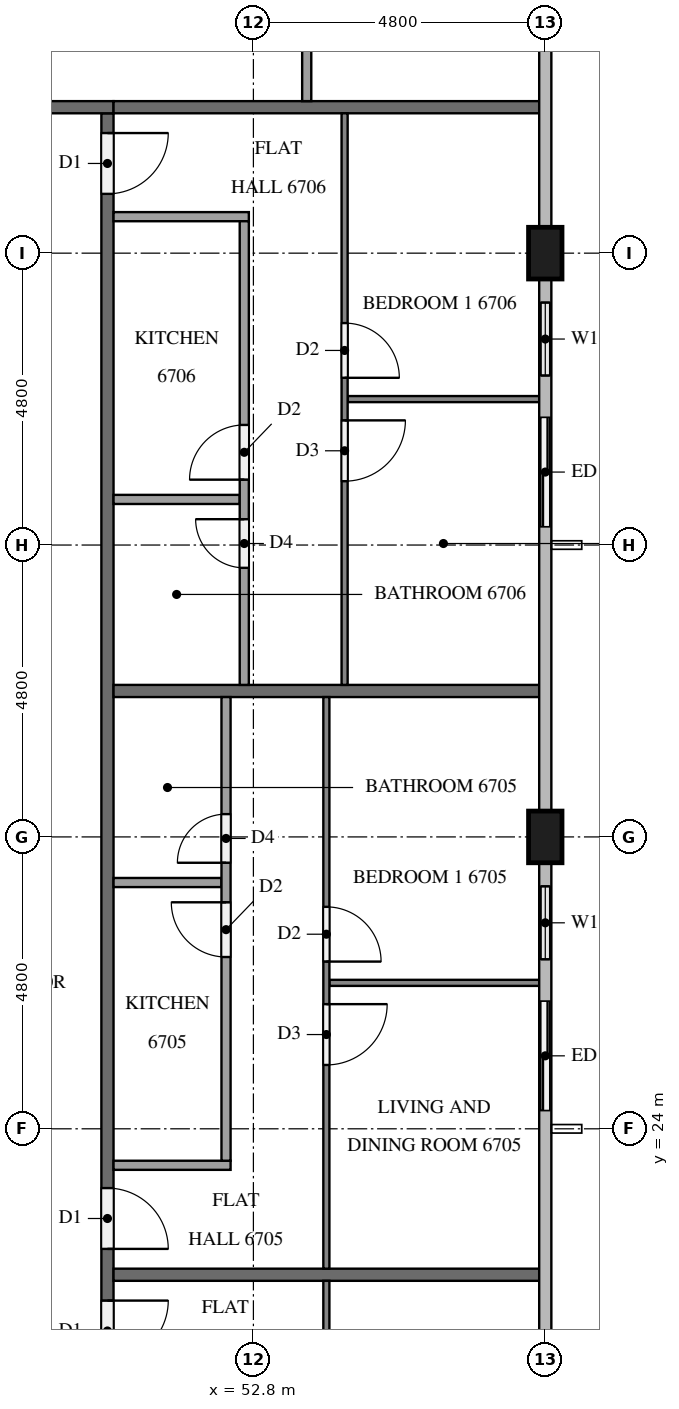
"""IFC4 building model, lengths in metres.
Left out: names, types, materials, properties, quantities, classifications, styles, units other than length and angle.
Written with IfcOpenShell. Run it as: python <this file> out.ifc"""

import sys

from ifc_helpers import new_model, si_unit, direction, frame, frame_2d, origin, origin_2d, place, context, subcontext, project, spatial, rectangle, extrude, element, fill, save


model = new_model("IFC4")
c1 = context("Model", 3, precision=1e-05, world=origin(), true_north=direction((0.0, 1.0)))
c2 = subcontext(c1, "Body", "Model", "MODEL_VIEW")
j1 = project(units=[si_unit("LENGTHUNIT", "METRE"), si_unit("PLANEANGLEUNIT", "RADIAN")], contexts=[c1])
p1 = place(None, origin())
s1 = spatial("IfcSite", under=j1, at=p1, CompositionType="ELEMENT")
p2 = place(p1, origin())
s2 = spatial("IfcBuilding", under=s1, at=p2, CompositionType="ELEMENT")
p3 = place(p2, frame((0.0, 0.0, 256.2)))
s3 = spatial("IfcBuildingStorey", under=s2, at=p3, CompositionType="ELEMENT", Elevation=256.2)
for number, where, z_axis, x_axis in (
    (1, (57.6, 28.8, 0.0), (0.0, 0.0, 1.0), (0.0, 1.0, 0.0)),
    (2, (57.6, 38.4, 0.0), (0.0, 0.0, 1.0), (0.0, 1.0, 0.0)),
):
    element("IfcColumn", number, at=place(p3, frame(where, z_axis=z_axis, x_axis=x_axis)), inside=s3, PredefinedType="COLUMN", context=c2, shape_type="SweptSolid", body=[
        extrude(rectangle(XDim=0.85, YDim=0.55, at=origin_2d()), origin(), (0.0, 0.0, 1.0), 3.2),
    ])
p4 = place(p3, frame((57.6, 24.0, 0.0), z_axis=(0.0, 0.0, 1.0), x_axis=(0.0, 1.0, 0.0)))
e3 = element("IfcWall", 3, at=p4, inside=s3, PredefinedType="SOLIDWALL", context=c2, shape_type="SweptSolid", body=[
    extrude(rectangle(XDim=4.375, YDim=0.15, at=frame_2d((2.188, 0.0))), origin(), (0.0, 0.0, 1.0), 3.2),
])
p5 = place(p4, frame((0.3, 0.0, 0.0)))
e4 = element("IfcOpeningElement", 4, at=p5, cuts=e3, PredefinedType="OPENING", context=c2, shape_type="SweptSolid", body=[
    extrude(rectangle(XDim=1.8, YDim=2.4, at=frame_2d((0.9, 1.2))), frame((0.0, 0.085, 0.0), z_axis=(0.0, -1.0, 0.0), x_axis=(1.0, 0.0, 0.0)), (0.0, 0.0, 1.0), 0.17),
])
p6 = place(p4, frame((2.788, 0.0, 0.9)))
e5 = element("IfcOpeningElement", 5, at=p6, cuts=e3, PredefinedType="OPENING", context=c2, shape_type="SweptSolid", body=[
    extrude(rectangle(XDim=1.2, YDim=1.4, at=frame_2d((0.6, 0.7))), frame((0.0, 0.085, 0.0), z_axis=(0.0, -1.0, 0.0), x_axis=(1.0, 0.0, 0.0)), (0.0, 0.0, 1.0), 0.17),
])
p7 = place(p3, frame((57.6, 33.6, 0.0), z_axis=(0.0, 0.0, 1.0), x_axis=(0.0, 1.0, 0.0)))
e6 = element("IfcWall", 6, at=p7, inside=s3, PredefinedType="SOLIDWALL", context=c2, shape_type="SweptSolid", body=[
    extrude(rectangle(XDim=4.375, YDim=0.15, at=frame_2d((2.188, 0.0))), origin(), (0.0, 0.0, 1.0), 3.2),
])
p8 = place(p7, frame((0.3, 0.0, 0.0)))
e7 = element("IfcOpeningElement", 7, at=p8, cuts=e6, PredefinedType="OPENING", context=c2, shape_type="SweptSolid", body=[
    extrude(rectangle(XDim=1.8, YDim=2.4, at=frame_2d((0.9, 1.2))), frame((0.0, 0.085, 0.0), z_axis=(0.0, -1.0, 0.0), x_axis=(1.0, 0.0, 0.0)), (0.0, 0.0, 1.0), 0.17),
])
p9 = place(p7, frame((2.788, 0.0, 0.9)))
e8 = element("IfcOpeningElement", 8, at=p9, cuts=e6, PredefinedType="OPENING", context=c2, shape_type="SweptSolid", body=[
    extrude(rectangle(XDim=1.2, YDim=1.4, at=frame_2d((0.6, 0.7))), frame((0.0, 0.085, 0.0), z_axis=(0.0, -1.0, 0.0), x_axis=(1.0, 0.0, 0.0)), (0.0, 0.0, 1.0), 0.17),
])
p10 = place(p3, frame((50.4, 40.7, 0.0), z_axis=(0.0, 0.0, 1.0), x_axis=(0.0, -1.0, 0.0)))
e9 = element("IfcWall", 9, at=p10, inside=s3, PredefinedType="PARTITIONING", context=c2, shape_type="SweptSolid", body=[
    extrude(rectangle(XDim=28.6, YDim=0.2, at=frame_2d((14.3, 0.0))), origin(), (0.0, 0.0, 1.0), 3.2),
])
p11 = place(p10, frame((19.525, 0.0, 0.0)))
e10 = element("IfcOpeningElement", 10, at=p11, cuts=e9, PredefinedType="OPENING", context=c2, shape_type="SweptSolid", body=[
    extrude(rectangle(XDim=1.0, YDim=2.1, at=frame_2d((0.5, 1.05))), frame((0.0, 0.11, 0.0), z_axis=(0.0, -1.0, 0.0), x_axis=(1.0, 0.0, 0.0)), (0.0, 0.0, 1.0), 0.22),
])
p12 = place(p10, frame((17.675, 0.0, 0.0)))
e11 = element("IfcOpeningElement", 11, at=p12, cuts=e9, PredefinedType="OPENING", context=c2, shape_type="SweptSolid", body=[
    extrude(rectangle(XDim=1.0, YDim=2.1, at=frame_2d((0.5, 1.05))), frame((0.0, 0.11, 0.0), z_axis=(0.0, -1.0, 0.0), x_axis=(1.0, 0.0, 0.0)), (0.0, 0.0, 1.0), 0.22),
])
p13 = place(p10, frame((0.325, 0.0, 0.0)))
e12 = element("IfcOpeningElement", 12, at=p13, cuts=e9, PredefinedType="OPENING", context=c2, shape_type="SweptSolid", body=[
    extrude(rectangle(XDim=1.0, YDim=2.1, at=frame_2d((0.5, 1.05))), frame((0.0, 0.11, 0.0), z_axis=(0.0, -1.0, 0.0), x_axis=(1.0, 0.0, 0.0)), (0.0, 0.0, 1.0), 0.22),
])
p14 = place(p3, frame((11.9, 40.8, 0.0), z_axis=(0.0, 0.0, 1.0), x_axis=(1.0, 0.0, 0.0)))
e13 = element("IfcWall", 13, at=p14, inside=s3, PredefinedType="PARTITIONING", context=c2, shape_type="SweptSolid", body=[
    extrude(rectangle(XDim=38.6, YDim=0.2, at=frame_2d((19.3, 0.0))), origin(), (0.0, 0.0, 1.0), 3.2),
])
p15 = place(p14, frame((31.725, 0.0, 0.0)))
e14 = element("IfcOpeningElement", 14, at=p15, cuts=e13, PredefinedType="OPENING", context=c2, shape_type="SweptSolid", body=[
    extrude(rectangle(XDim=1.0, YDim=2.1, at=frame_2d((0.5, 1.05))), frame((0.0, 0.11, 0.0), z_axis=(0.0, -1.0, 0.0), x_axis=(1.0, 0.0, 0.0)), (0.0, 0.0, 1.0), 0.22),
])
p16 = place(p14, frame((17.325, 0.0, 0.0)))
e15 = element("IfcOpeningElement", 15, at=p16, cuts=e13, PredefinedType="OPENING", context=c2, shape_type="SweptSolid", body=[
    extrude(rectangle(XDim=1.0, YDim=2.1, at=frame_2d((0.5, 1.05))), frame((0.0, 0.11, 0.0), z_axis=(0.0, -1.0, 0.0), x_axis=(1.0, 0.0, 0.0)), (0.0, 0.0, 1.0), 0.22),
])
p17 = place(p14, frame((0.525, 0.0, 0.0)))
e16 = element("IfcOpeningElement", 16, at=p17, cuts=e13, PredefinedType="OPENING", context=c2, shape_type="SweptSolid", body=[
    extrude(rectangle(XDim=1.0, YDim=2.1, at=frame_2d((0.5, 1.05))), frame((0.0, 0.11, 0.0), z_axis=(0.0, -1.0, 0.0), x_axis=(1.0, 0.0, 0.0)), (0.0, 0.0, 1.0), 0.22),
])
for number, where, z_axis, x_axis in (
    (17, (50.5, 21.6, 0.0), (0.0, 0.0, 1.0), (1.0, 0.0, 0.0)),
    (18, (50.5, 31.2, 0.0), (0.0, 0.0, 1.0), (1.0, 0.0, 0.0)),
    (19, (50.5, 40.8, 0.0), (0.0, 0.0, 1.0), (1.0, 0.0, 0.0)),
):
    element("IfcWall", number, at=place(p3, frame(where, z_axis=z_axis, x_axis=x_axis)), inside=s3, PredefinedType="PARTITIONING", context=c2, shape_type="SweptSolid", body=[
        extrude(rectangle(XDim=7.0, YDim=0.2, at=frame_2d((3.5, 0.0))), origin(), (0.0, 0.0, 1.0), 3.2),
    ])
p18 = place(p3, frame((54.0, 21.5, 0.0), z_axis=(0.0, 0.0, 1.0), x_axis=(0.0, -1.0, 0.0)))
e20 = element("IfcWall", 20, at=p18, inside=s3, PredefinedType="PARTITIONING", context=c2, shape_type="SweptSolid", body=[
    extrude(rectangle(XDim=16.279, YDim=0.1, at=frame_2d((8.139, 0.0))), origin(), (0.0, 0.0, 1.0), 3.2),
])
p19 = place(p18, frame((3.45, 0.0, 0.0)))
e21 = element("IfcOpeningElement", 21, at=p19, cuts=e20, PredefinedType="OPENING", context=c2, shape_type="SweptSolid", body=[
    extrude(rectangle(XDim=0.9, YDim=2.1, at=frame_2d((0.45, 1.05))), frame((0.0, 0.06, 0.0), z_axis=(0.0, -1.0, 0.0), x_axis=(1.0, 0.0, 0.0)), (0.0, 0.0, 1.0), 0.12),
])
p20 = place(p18, frame((5.05, 0.0, 0.0)))
e22 = element("IfcOpeningElement", 22, at=p20, cuts=e20, PredefinedType="OPENING", context=c2, shape_type="SweptSolid", body=[
    extrude(rectangle(XDim=0.9, YDim=2.1, at=frame_2d((0.45, 1.05))), frame((0.0, 0.06, 0.0), z_axis=(0.0, -1.0, 0.0), x_axis=(1.0, 0.0, 0.0)), (0.0, 0.0, 1.0), 0.12),
])
p21 = place(p18, frame((14.979, 0.0, 0.0)))
e23 = element("IfcOpeningElement", 23, at=p21, cuts=e20, PredefinedType="OPENING", context=c2, shape_type="SweptSolid", body=[
    extrude(rectangle(XDim=1.0, YDim=2.1, at=frame_2d((0.5, 1.05))), frame((0.0, 0.06, 0.0), z_axis=(0.0, -1.0, 0.0), x_axis=(1.0, 0.0, 0.0)), (0.0, 0.0, 1.0), 0.12),
])
p22 = place(p3, frame((54.05, 26.4, 0.0), z_axis=(0.0, 0.0, 1.0), x_axis=(1.0, 0.0, 0.0)))
e24 = element("IfcWall", 24, at=p22, inside=s3, PredefinedType="PARTITIONING", context=c2, shape_type="SweptSolid", body=[
    extrude(rectangle(XDim=3.45, YDim=0.1, at=frame_2d((1.725, 0.0))), origin(), (0.0, 0.0, 1.0), 3.2),
])
p23 = place(p3, frame((54.0, 31.1, 0.0), z_axis=(0.0, 0.0, 1.0), x_axis=(0.0, -1.0, 0.0)))
e25 = element("IfcWall", 25, at=p23, inside=s3, PredefinedType="PARTITIONING", context=c2, shape_type="SweptSolid", body=[
    extrude(rectangle(XDim=9.4, YDim=0.1, at=frame_2d((4.7, 0.0))), origin(), (0.0, 0.0, 1.0), 3.2),
])
p24 = place(p23, frame((5.05, 0.0, 0.0)))
e26 = element("IfcOpeningElement", 26, at=p24, cuts=e25, PredefinedType="OPENING", context=c2, shape_type="SweptSolid", body=[
    extrude(rectangle(XDim=1.0, YDim=2.1, at=frame_2d((0.5, 1.05))), frame((0.0, 0.06, 0.0), z_axis=(0.0, -1.0, 0.0), x_axis=(1.0, 0.0, 0.0)), (0.0, 0.0, 1.0), 0.12),
])
p25 = place(p23, frame((3.45, 0.0, 0.0)))
e27 = element("IfcOpeningElement", 27, at=p25, cuts=e25, PredefinedType="OPENING", context=c2, shape_type="SweptSolid", body=[
    extrude(rectangle(XDim=0.9, YDim=2.1, at=frame_2d((0.45, 1.05))), frame((0.0, 0.06, 0.0), z_axis=(0.0, -1.0, 0.0), x_axis=(1.0, 0.0, 0.0)), (0.0, 0.0, 1.0), 0.12),
])
p26 = place(p3, frame((50.5, 28.05, 0.0), z_axis=(0.0, 0.0, 1.0), x_axis=(1.0, 0.0, 0.0)))
e28 = element("IfcWall", 28, at=p26, inside=s3, PredefinedType="PARTITIONING", context=c2, shape_type="SweptSolid", body=[
    extrude(rectangle(XDim=1.775, YDim=0.15, at=frame_2d((0.887, 0.0))), origin(), (0.0, 0.0, 1.0), 3.2),
])
p27 = place(p3, frame((50.5, 23.4, 0.0), z_axis=(0.0, 0.0, 1.0), x_axis=(1.0, 0.0, 0.0)))
e29 = element("IfcWall", 29, at=p27, inside=s3, PredefinedType="PARTITIONING", context=c2, shape_type="SweptSolid", body=[
    extrude(rectangle(XDim=1.925, YDim=0.15, at=frame_2d((0.962, 0.0))), origin(), (0.0, 0.0, 1.0), 3.2),
])
p28 = place(p3, frame((52.35, 23.475, 0.0), z_axis=(0.0, 0.0, 1.0), x_axis=(0.0, 1.0, 0.0)))
e30 = element("IfcWall", 30, at=p28, inside=s3, PredefinedType="PARTITIONING", context=c2, shape_type="SweptSolid", body=[
    extrude(rectangle(XDim=7.625, YDim=0.15, at=frame_2d((3.812, 0.0))), origin(), (0.0, 0.0, 1.0), 3.2),
])
p29 = place(p28, frame((3.35, 0.0, 0.0)))
e31 = element("IfcOpeningElement", 31, at=p29, cuts=e30, PredefinedType="OPENING", context=c2, shape_type="SweptSolid", body=[
    extrude(rectangle(XDim=0.9, YDim=2.1, at=frame_2d((0.45, 1.05))), frame((0.0, 0.085, 0.0), z_axis=(0.0, -1.0, 0.0), x_axis=(1.0, 0.0, 0.0)), (0.0, 0.0, 1.0), 0.17),
])
p30 = place(p28, frame((4.9, 0.0, 0.0)))
e32 = element("IfcOpeningElement", 32, at=p30, cuts=e30, PredefinedType="OPENING", context=c2, shape_type="SweptSolid", body=[
    extrude(rectangle(XDim=0.8, YDim=2.1, at=frame_2d((0.4, 1.05))), frame((0.0, 0.085, 0.0), z_axis=(0.0, -1.0, 0.0), x_axis=(1.0, 0.0, 0.0)), (0.0, 0.0, 1.0), 0.17),
])
p31 = place(p3, frame((54.35, 36.0, 0.0), z_axis=(0.0, 0.0, 1.0), x_axis=(1.0, 0.0, 0.0)))
e33 = element("IfcWall", 33, at=p31, inside=s3, PredefinedType="PARTITIONING", context=c2, shape_type="SweptSolid", body=[
    extrude(rectangle(XDim=3.15, YDim=0.1, at=frame_2d((1.575, 0.0))), origin(), (0.0, 0.0, 1.0), 3.2),
])
p32 = place(p3, frame((54.3, 40.7, 0.0), z_axis=(0.0, 0.0, 1.0), x_axis=(0.0, -1.0, 0.0)))
e34 = element("IfcWall", 34, at=p32, inside=s3, PredefinedType="PARTITIONING", context=c2, shape_type="SweptSolid", body=[
    extrude(rectangle(XDim=9.4, YDim=0.1, at=frame_2d((4.7, 0.0))), origin(), (0.0, 0.0, 1.0), 3.2),
])
p33 = place(p32, frame((3.45, 0.0, 0.0)))
e35 = element("IfcOpeningElement", 35, at=p33, cuts=e34, PredefinedType="OPENING", context=c2, shape_type="SweptSolid", body=[
    extrude(rectangle(XDim=0.9, YDim=2.1, at=frame_2d((0.45, 1.05))), frame((0.0, 0.06, 0.0), z_axis=(0.0, -1.0, 0.0), x_axis=(1.0, 0.0, 0.0)), (0.0, 0.0, 1.0), 0.12),
])
p34 = place(p32, frame((5.05, 0.0, 0.0)))
e36 = element("IfcOpeningElement", 36, at=p34, cuts=e34, PredefinedType="OPENING", context=c2, shape_type="SweptSolid", body=[
    extrude(rectangle(XDim=1.0, YDim=2.1, at=frame_2d((0.5, 1.05))), frame((0.0, 0.06, 0.0), z_axis=(0.0, -1.0, 0.0), x_axis=(1.0, 0.0, 0.0)), (0.0, 0.0, 1.0), 0.12),
])
p35 = place(p3, frame((50.5, 34.35, 0.0), z_axis=(0.0, 0.0, 1.0), x_axis=(1.0, 0.0, 0.0)))
e37 = element("IfcWall", 37, at=p35, inside=s3, PredefinedType="PARTITIONING", context=c2, shape_type="SweptSolid", body=[
    extrude(rectangle(XDim=2.075, YDim=0.15, at=frame_2d((1.038, 0.0))), origin(), (0.0, 0.0, 1.0), 3.2),
])
p36 = place(p3, frame((50.5, 39.0, 0.0), z_axis=(0.0, 0.0, 1.0), x_axis=(1.0, 0.0, 0.0)))
e38 = element("IfcWall", 38, at=p36, inside=s3, PredefinedType="PARTITIONING", context=c2, shape_type="SweptSolid", body=[
    extrude(rectangle(XDim=2.225, YDim=0.15, at=frame_2d((1.113, 0.0))), origin(), (0.0, 0.0, 1.0), 3.2),
])
p37 = place(p3, frame((52.65, 31.3, 0.0), z_axis=(0.0, 0.0, 1.0), x_axis=(0.0, 1.0, 0.0)))
e39 = element("IfcWall", 39, at=p37, inside=s3, PredefinedType="PARTITIONING", context=c2, shape_type="SweptSolid", body=[
    extrude(rectangle(XDim=7.625, YDim=0.15, at=frame_2d((3.812, 0.0))), origin(), (0.0, 0.0, 1.0), 3.2),
])
p38 = place(p37, frame((3.375, 0.0, 0.0)))
e40 = element("IfcOpeningElement", 40, at=p38, cuts=e39, PredefinedType="OPENING", context=c2, shape_type="SweptSolid", body=[
    extrude(rectangle(XDim=0.9, YDim=2.1, at=frame_2d((0.45, 1.05))), frame((0.0, 0.085, 0.0), z_axis=(0.0, -1.0, 0.0), x_axis=(1.0, 0.0, 0.0)), (0.0, 0.0, 1.0), 0.17),
])
p39 = place(p37, frame((1.925, 0.0, 0.0)))
e41 = element("IfcOpeningElement", 41, at=p39, cuts=e39, PredefinedType="OPENING", context=c2, shape_type="SweptSolid", body=[
    extrude(rectangle(XDim=0.8, YDim=2.1, at=frame_2d((0.4, 1.05))), frame((0.0, 0.085, 0.0), z_axis=(0.0, -1.0, 0.0), x_axis=(1.0, 0.0, 0.0)), (0.0, 0.0, 1.0), 0.17),
])
p40 = place(p3, frame((53.677, 40.9, 0.0), z_axis=(0.0, 0.0, 1.0), x_axis=(0.0, 1.0, 0.0)))
e42 = element("IfcWall", 42, at=p40, inside=s3, PredefinedType="PARTITIONING", context=c2, shape_type="SweptSolid", body=[
    extrude(rectangle(XDim=2.975, YDim=0.15, at=frame_2d((1.488, 0.0))), origin(), (0.0, 0.0, 1.0), 3.2),
])
p41 = place(p5, origin())
e43 = element("IfcDoor", 43, at=p41, inside=s3, OperationType="SLIDING_TO_LEFT", PredefinedType="DOOR", context=c2, shape_type="SweptSolid", body=[
    extrude(rectangle(XDim=1.8, YDim=2.4, at=frame_2d((0.9, 1.2))), frame((0.0, 0.025, 0.0), z_axis=(0.0, -1.0, 0.0), x_axis=(1.0, 0.0, 0.0)), (0.0, 0.0, 1.0), 0.05),
])
fill(e4, e43)
p42 = place(p6, origin())
e44 = element("IfcWindow", 44, at=p42, inside=s3, PartitioningType="SINGLE_PANEL", PredefinedType="WINDOW", context=c2, shape_type="SweptSolid", body=[
    extrude(rectangle(XDim=1.2, YDim=1.4, at=frame_2d((0.6, 0.7))), frame((0.0, 0.03, 0.0), z_axis=(0.0, -1.0, 0.0), x_axis=(1.0, 0.0, 0.0)), (0.0, 0.0, 1.0), 0.06),
])
fill(e5, e44)
p43 = place(p8, origin())
e45 = element("IfcDoor", 45, at=p43, inside=s3, OperationType="SLIDING_TO_RIGHT", PredefinedType="DOOR", context=c2, shape_type="SweptSolid", body=[
    extrude(rectangle(XDim=1.8, YDim=2.4, at=frame_2d((0.9, 1.2))), frame((0.0, 0.025, 0.0), z_axis=(0.0, -1.0, 0.0), x_axis=(1.0, 0.0, 0.0)), (0.0, 0.0, 1.0), 0.05),
])
fill(e7, e45)
p44 = place(p9, origin())
e46 = element("IfcWindow", 46, at=p44, inside=s3, PartitioningType="SINGLE_PANEL", PredefinedType="WINDOW", context=c2, shape_type="SweptSolid", body=[
    extrude(rectangle(XDim=1.2, YDim=1.4, at=frame_2d((0.6, 0.7))), frame((0.0, 0.03, 0.0), z_axis=(0.0, -1.0, 0.0), x_axis=(1.0, 0.0, 0.0)), (0.0, 0.0, 1.0), 0.06),
])
fill(e8, e46)
p45 = place(p11, origin())
e47 = element("IfcDoor", 47, at=p45, inside=s3, OperationType="SINGLE_SWING_LEFT", PredefinedType="DOOR", context=c2, shape_type="SweptSolid", body=[
    extrude(rectangle(XDim=1.0, YDim=2.1, at=frame_2d((0.5, 1.05))), frame((0.0, 0.025, 0.0), z_axis=(0.0, -1.0, 0.0), x_axis=(1.0, 0.0, 0.0)), (0.0, 0.0, 1.0), 0.05),
])
fill(e10, e47)
p46 = place(p12, origin())
e48 = element("IfcDoor", 48, at=p46, inside=s3, OperationType="SINGLE_SWING_RIGHT", PredefinedType="DOOR", context=c2, shape_type="SweptSolid", body=[
    extrude(rectangle(XDim=1.0, YDim=2.1, at=frame_2d((0.5, 1.05))), frame((0.0, 0.025, 0.0), z_axis=(0.0, -1.0, 0.0), x_axis=(1.0, 0.0, 0.0)), (0.0, 0.0, 1.0), 0.05),
])
fill(e11, e48)
p47 = place(p13, origin())
e49 = element("IfcDoor", 49, at=p47, inside=s3, OperationType="SINGLE_SWING_LEFT", PredefinedType="DOOR", context=c2, shape_type="SweptSolid", body=[
    extrude(rectangle(XDim=1.0, YDim=2.1, at=frame_2d((0.5, 1.05))), frame((0.0, 0.025, 0.0), z_axis=(0.0, -1.0, 0.0), x_axis=(1.0, 0.0, 0.0)), (0.0, 0.0, 1.0), 0.05),
])
fill(e12, e49)
p48 = place(p24, origin())
e50 = element("IfcDoor", 50, at=p48, inside=s3, OperationType="SINGLE_SWING_LEFT", PredefinedType="DOOR", context=c2, shape_type="SweptSolid", body=[
    extrude(rectangle(XDim=1.0, YDim=2.1, at=frame_2d((0.5, 1.05))), frame((0.0, 0.025, 0.0), z_axis=(0.0, -1.0, 0.0), x_axis=(1.0, 0.0, 0.0)), (0.0, 0.0, 1.0), 0.05),
])
fill(e26, e50)
p49 = place(p25, origin())
e51 = element("IfcDoor", 51, at=p49, inside=s3, OperationType="SINGLE_SWING_RIGHT", PredefinedType="DOOR", context=c2, shape_type="SweptSolid", body=[
    extrude(rectangle(XDim=0.9, YDim=2.1, at=frame_2d((0.45, 1.05))), frame((0.0, 0.025, 0.0), z_axis=(0.0, -1.0, 0.0), x_axis=(1.0, 0.0, 0.0)), (0.0, 0.0, 1.0), 0.05),
])
fill(e27, e51)
p50 = place(p29, origin())
e52 = element("IfcDoor", 52, at=p50, inside=s3, OperationType="SINGLE_SWING_RIGHT", PredefinedType="DOOR", context=c2, shape_type="SweptSolid", body=[
    extrude(rectangle(XDim=0.9, YDim=2.1, at=frame_2d((0.45, 1.05))), frame((0.0, 0.025, 0.0), z_axis=(0.0, -1.0, 0.0), x_axis=(1.0, 0.0, 0.0)), (0.0, 0.0, 1.0), 0.05),
])
fill(e31, e52)
p51 = place(p30, origin())
e53 = element("IfcDoor", 53, at=p51, inside=s3, OperationType="SINGLE_SWING_LEFT", PredefinedType="DOOR", context=c2, shape_type="SweptSolid", body=[
    extrude(rectangle(XDim=0.8, YDim=2.1, at=frame_2d((0.4, 1.05))), frame((0.0, 0.025, 0.0), z_axis=(0.0, -1.0, 0.0), x_axis=(1.0, 0.0, 0.0)), (0.0, 0.0, 1.0), 0.05),
])
fill(e32, e53)
p52 = place(p33, origin())
e54 = element("IfcDoor", 54, at=p52, inside=s3, OperationType="SINGLE_SWING_RIGHT", PredefinedType="DOOR", context=c2, shape_type="SweptSolid", body=[
    extrude(rectangle(XDim=0.9, YDim=2.1, at=frame_2d((0.45, 1.05))), frame((0.0, 0.025, 0.0), z_axis=(0.0, -1.0, 0.0), x_axis=(1.0, 0.0, 0.0)), (0.0, 0.0, 1.0), 0.05),
])
fill(e35, e54)
p53 = place(p34, origin())
e55 = element("IfcDoor", 55, at=p53, inside=s3, OperationType="SINGLE_SWING_LEFT", PredefinedType="DOOR", context=c2, shape_type="SweptSolid", body=[
    extrude(rectangle(XDim=1.0, YDim=2.1, at=frame_2d((0.5, 1.05))), frame((0.0, 0.025, 0.0), z_axis=(0.0, -1.0, 0.0), x_axis=(1.0, 0.0, 0.0)), (0.0, 0.0, 1.0), 0.05),
])
fill(e36, e55)
p54 = place(p38, origin())
e56 = element("IfcDoor", 56, at=p54, inside=s3, OperationType="SINGLE_SWING_LEFT", PredefinedType="DOOR", context=c2, shape_type="SweptSolid", body=[
    extrude(rectangle(XDim=0.9, YDim=2.1, at=frame_2d((0.45, 1.05))), frame((0.0, 0.025, 0.0), z_axis=(0.0, -1.0, 0.0), x_axis=(1.0, 0.0, 0.0)), (0.0, 0.0, 1.0), 0.05),
])
fill(e40, e56)
p55 = place(p39, origin())
e57 = element("IfcDoor", 57, at=p55, inside=s3, OperationType="SINGLE_SWING_RIGHT", PredefinedType="DOOR", context=c2, shape_type="SweptSolid", body=[
    extrude(rectangle(XDim=0.8, YDim=2.1, at=frame_2d((0.4, 1.05))), frame((0.0, 0.025, 0.0), z_axis=(0.0, -1.0, 0.0), x_axis=(1.0, 0.0, 0.0)), (0.0, 0.0, 1.0), 0.05),
])
fill(e41, e57)
save(model, sys.argv[1])
